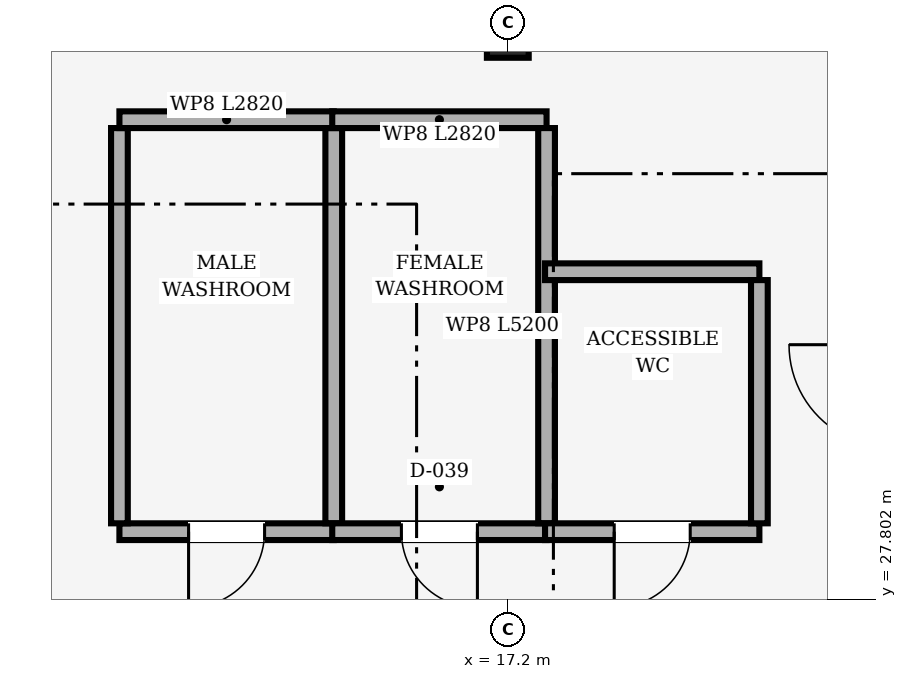
"""IFC4 building model, lengths in metres.
Left out: names, types, materials, properties, quantities, classifications, styles, units other than length and angle.
Written with IfcOpenShell. Run it as: python <this file> out.ifc"""

import sys

from ifc_helpers import new_model, si_unit, direction, frame, frame_2d, origin, origin_2d, place, context, subcontext, project, spatial, rectangle, extrude, element, fill, save


model = new_model("IFC4")
c1 = context("Model", 3, precision=1e-05, world=origin(), true_north=direction((0.0, 1.0)))
c2 = subcontext(c1, "Body", "Model", "MODEL_VIEW")
j1 = project(units=[si_unit("LENGTHUNIT", "METRE"), si_unit("PLANEANGLEUNIT", "RADIAN")], contexts=[c1])
p1 = place(None, origin())
s1 = spatial("IfcSite", under=j1, at=p1, CompositionType="ELEMENT")
p2 = place(p1, origin())
s2 = spatial("IfcBuilding", under=s1, at=p2, CompositionType="ELEMENT")
p3 = place(p2, frame((0.0, 0.0, 25.5)))
s3 = spatial("IfcBuildingStorey", under=s2, at=p3, CompositionType="ELEMENT", Elevation=25.5)
p4 = place(p3, frame((17.2, 35.2, 0.0), z_axis=(0.0, 0.0, 1.0), x_axis=(1.0, 0.0, 0.0)))
e1 = element("IfcColumn", 1, at=p4, inside=s3, PredefinedType="COLUMN", context=c2, shape_type="SweptSolid", body=[
    extrude(rectangle(XDim=0.55, YDim=0.55, at=origin_2d()), origin(), (0.0, 0.0, 1.0), 2.91),
])
p5 = place(p3, frame((14.91, 28.69, 0.0), z_axis=(0.0, 0.0, 1.0), x_axis=(-1.0, 0.0, 0.0)))
e2 = element("IfcWall", 2, at=p5, inside=s3, PredefinedType="PLUMBINGWALL", context=c2, shape_type="SweptSolid", body=[
    extrude(rectangle(XDim=2.82, YDim=0.22, at=frame_2d((1.41, 0.0))), origin(), (0.0, 0.0, 1.0), 2.89),
])
p6 = place(p5, frame((0.91, 0.0, 0.0)))
e3 = element("IfcOpeningElement", 3, at=p6, cuts=e2, PredefinedType="OPENING", context=c2, shape_type="SweptSolid", body=[
    extrude(rectangle(XDim=1.0, YDim=2.1, at=frame_2d((0.5, 1.05))), frame((0.0, 0.11, 0.0), z_axis=(0.0, -1.0, 0.0), x_axis=(1.0, 0.0, 0.0)), (0.0, 0.0, 1.0), 0.22),
])
p7 = place(p3, frame((12.09, 28.8, 0.0), z_axis=(0.0, 0.0, 1.0), x_axis=(0.0, 1.0, 0.0)))
e4 = element("IfcWall", 4, at=p7, inside=s3, PredefinedType="PLUMBINGWALL", context=c2, shape_type="SweptSolid", body=[
    extrude(rectangle(XDim=5.2, YDim=0.22, at=frame_2d((2.6, 0.0))), origin(), (0.0, 0.0, 1.0), 2.89),
])
p8 = place(p3, frame((12.09, 34.11, 0.0), z_axis=(0.0, 0.0, 1.0), x_axis=(1.0, 0.0, 0.0)))
e5 = element("IfcWall", 5, at=p8, inside=s3, PredefinedType="PLUMBINGWALL", context=c2, shape_type="SweptSolid", body=[
    extrude(rectangle(XDim=2.82, YDim=0.22, at=frame_2d((1.41, 0.0))), origin(), (0.0, 0.0, 1.0), 2.89),
])
p9 = place(p3, frame((14.91, 34.0, 0.0), z_axis=(0.0, 0.0, 1.0), x_axis=(0.0, -1.0, 0.0)))
e6 = element("IfcWall", 6, at=p9, inside=s3, PredefinedType="PLUMBINGWALL", context=c2, shape_type="SweptSolid", body=[
    extrude(rectangle(XDim=5.2, YDim=0.22, at=frame_2d((2.6, 0.0))), origin(), (0.0, 0.0, 1.0), 2.89),
])
p10 = place(p3, frame((17.71, 28.69, 0.0), z_axis=(0.0, 0.0, 1.0), x_axis=(-1.0, 0.0, 0.0)))
e7 = element("IfcWall", 7, at=p10, inside=s3, PredefinedType="PLUMBINGWALL", context=c2, shape_type="SweptSolid", body=[
    extrude(rectangle(XDim=2.82, YDim=0.22, at=frame_2d((1.41, 0.0))), origin(), (0.0, 0.0, 1.0), 2.89),
])
p11 = place(p10, frame((0.91, 0.0, 0.0)))
e8 = element("IfcOpeningElement", 8, at=p11, cuts=e7, PredefinedType="OPENING", context=c2, shape_type="SweptSolid", body=[
    extrude(rectangle(XDim=1.0, YDim=2.1, at=frame_2d((0.5, 1.05))), frame((0.0, 0.11, 0.0), z_axis=(0.0, -1.0, 0.0), x_axis=(1.0, 0.0, 0.0)), (0.0, 0.0, 1.0), 0.22),
])
p12 = place(p3, frame((14.89, 34.11, 0.0), z_axis=(0.0, 0.0, 1.0), x_axis=(1.0, 0.0, 0.0)))
e9 = element("IfcWall", 9, at=p12, inside=s3, PredefinedType="PLUMBINGWALL", context=c2, shape_type="SweptSolid", body=[
    extrude(rectangle(XDim=2.82, YDim=0.22, at=frame_2d((1.41, 0.0))), origin(), (0.0, 0.0, 1.0), 2.89),
])
p13 = place(p3, frame((17.71, 34.0, 0.0), z_axis=(0.0, 0.0, 1.0), x_axis=(0.0, -1.0, 0.0)))
e10 = element("IfcWall", 10, at=p13, inside=s3, PredefinedType="PLUMBINGWALL", context=c2, shape_type="SweptSolid", body=[
    extrude(rectangle(XDim=5.2, YDim=0.22, at=frame_2d((2.6, 0.0))), origin(), (0.0, 0.0, 1.0), 2.89),
])
p14 = place(p3, frame((20.51, 28.69, 0.0), z_axis=(0.0, 0.0, 1.0), x_axis=(-1.0, 0.0, 0.0)))
e11 = element("IfcWall", 11, at=p14, inside=s3, PredefinedType="PLUMBINGWALL", context=c2, shape_type="SweptSolid", body=[
    extrude(rectangle(XDim=2.82, YDim=0.22, at=frame_2d((1.41, 0.0))), origin(), (0.0, 0.0, 1.0), 2.89),
])
p15 = place(p14, frame((0.91, 0.0, 0.0)))
e12 = element("IfcOpeningElement", 12, at=p15, cuts=e11, PredefinedType="OPENING", context=c2, shape_type="SweptSolid", body=[
    extrude(rectangle(XDim=1.0, YDim=2.1, at=frame_2d((0.5, 1.05))), frame((0.0, 0.11, 0.0), z_axis=(0.0, -1.0, 0.0), x_axis=(1.0, 0.0, 0.0)), (0.0, 0.0, 1.0), 0.22),
])
p16 = place(p3, frame((17.69, 32.11, 0.0), z_axis=(0.0, 0.0, 1.0), x_axis=(1.0, 0.0, 0.0)))
e13 = element("IfcWall", 13, at=p16, inside=s3, PredefinedType="PLUMBINGWALL", context=c2, shape_type="SweptSolid", body=[
    extrude(rectangle(XDim=2.82, YDim=0.22, at=frame_2d((1.41, 0.0))), origin(), (0.0, 0.0, 1.0), 2.89),
])
p17 = place(p3, frame((20.51, 32.0, 0.0), z_axis=(0.0, 0.0, 1.0), x_axis=(0.0, -1.0, 0.0)))
e14 = element("IfcWall", 14, at=p17, inside=s3, PredefinedType="PLUMBINGWALL", context=c2, shape_type="SweptSolid", body=[
    extrude(rectangle(XDim=3.2, YDim=0.22, at=frame_2d((1.6, 0.0))), origin(), (0.0, 0.0, 1.0), 2.89),
])
p18 = place(p6, origin())
e15 = element("IfcDoor", 15, at=p18, inside=s3, OperationType="SINGLE_SWING_RIGHT", PredefinedType="DOOR", context=c2, shape_type="SweptSolid", body=[
    extrude(rectangle(XDim=1.0, YDim=2.1, at=frame_2d((0.5, 1.05))), frame((0.0, 0.025, 0.0), z_axis=(0.0, -1.0, 0.0), x_axis=(1.0, 0.0, 0.0)), (0.0, 0.0, 1.0), 0.05),
])
fill(e3, e15)
p19 = place(p11, origin())
e16 = element("IfcDoor", 16, at=p19, inside=s3, OperationType="SINGLE_SWING_LEFT", PredefinedType="DOOR", context=c2, shape_type="SweptSolid", body=[
    extrude(rectangle(XDim=1.0, YDim=2.1, at=frame_2d((0.5, 1.05))), frame((0.0, 0.025, 0.0), z_axis=(0.0, -1.0, 0.0), x_axis=(1.0, 0.0, 0.0)), (0.0, 0.0, 1.0), 0.05),
])
fill(e8, e16)
p20 = place(p15, origin())
e17 = element("IfcDoor", 17, at=p20, inside=s3, OperationType="SINGLE_SWING_RIGHT", PredefinedType="DOOR", context=c2, shape_type="SweptSolid", body=[
    extrude(rectangle(XDim=1.0, YDim=2.1, at=frame_2d((0.5, 1.05))), frame((0.0, 0.025, 0.0), z_axis=(0.0, -1.0, 0.0), x_axis=(1.0, 0.0, 0.0)), (0.0, 0.0, 1.0), 0.05),
])
fill(e12, e17)
save(model, sys.argv[1])
